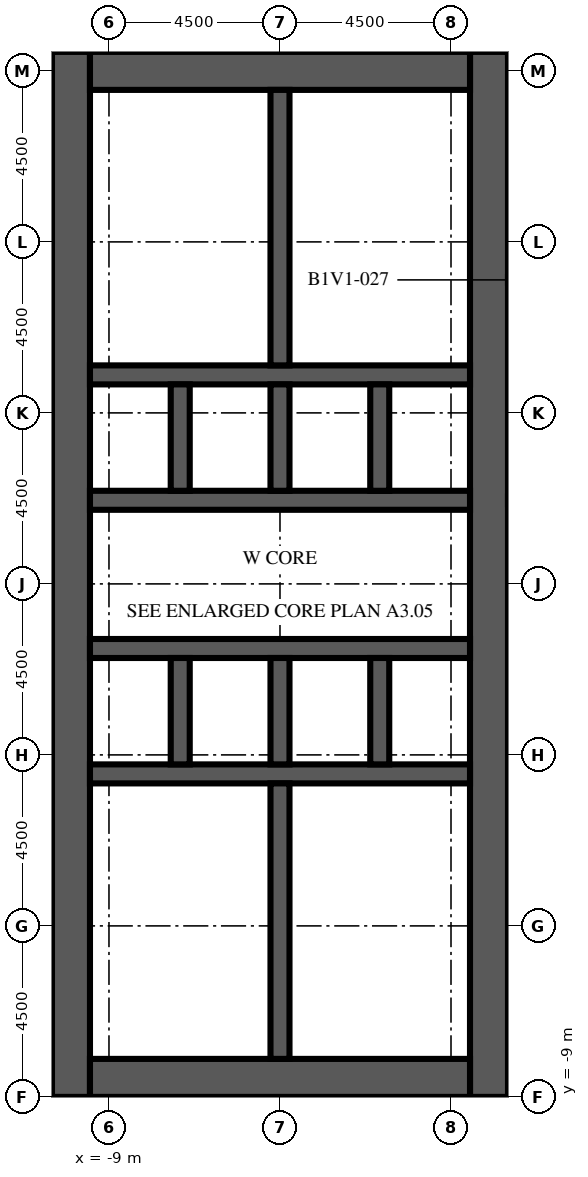
"""IFC4 building model, lengths in metres.
Left out: names, types, materials, properties, quantities, classifications, styles, units other than length and angle.
Written with IfcOpenShell. Run it as: python <this file> out.ifc"""

import sys

from ifc_helpers import new_model, si_unit, direction, frame, frame_2d, origin, place, context, subcontext, project, spatial, rectangle, extrude, element, fill, save


model = new_model("IFC4")
c1 = context("Model", 3, precision=1e-05, world=origin(), true_north=direction((0.0, 1.0)))
c2 = subcontext(c1, "Body", "Model", "MODEL_VIEW")
j1 = project(units=[si_unit("LENGTHUNIT", "METRE"), si_unit("PLANEANGLEUNIT", "RADIAN")], contexts=[c1])
p1 = place(None, origin())
s1 = spatial("IfcSite", under=j1, at=p1, CompositionType="ELEMENT")
p2 = place(p1, origin())
s2 = spatial("IfcBuilding", under=s1, at=p2, CompositionType="ELEMENT")
p3 = place(p2, frame((0.0, 0.0, 23.6)))
s3 = spatial("IfcBuildingStorey", under=s2, at=p3, CompositionType="ELEMENT", Elevation=23.6)
p4 = place(p3, frame((-10.0, -9.0, 0.0), z_axis=(0.0, 0.0, 1.0), x_axis=(0.0, 1.0, 0.0)))
e1 = element("IfcWall", 1, at=p4, inside=s3, PredefinedType="SHEAR", context=c2, shape_type="SweptSolid", body=[
    extrude(rectangle(XDim=27.5, YDim=1.0, at=frame_2d((13.75, 0.0))), origin(), (0.0, 0.0, 1.0), 4.1),
])
p5 = place(p4, frame((12.55, 0.0, 0.0)))
e2 = element("IfcOpeningElement", 2, at=p5, cuts=e1, PredefinedType="OPENING", context=c2, shape_type="SweptSolid", body=[
    extrude(rectangle(XDim=2.4, YDim=2.4, at=frame_2d((1.2, 1.2))), frame((0.0, 0.51, 0.0), z_axis=(0.0, -1.0, 0.0), x_axis=(1.0, 0.0, 0.0)), (0.0, 0.0, 1.0), 1.02),
])
p6 = place(p4, frame((6.825, 0.0, 0.0)))
e3 = element("IfcOpeningElement", 3, at=p6, cuts=e1, PredefinedType="OPENING", context=c2, shape_type="SweptSolid", body=[
    extrude(rectangle(XDim=1.2, YDim=2.1, at=frame_2d((0.6, 1.05))), frame((0.0, 0.51, 0.0), z_axis=(0.0, -1.0, 0.0), x_axis=(1.0, 0.0, 0.0)), (0.0, 0.0, 1.0), 1.02),
])
p7 = place(p4, frame((19.475, 0.0, 0.0)))
e4 = element("IfcOpeningElement", 4, at=p7, cuts=e1, PredefinedType="OPENING", context=c2, shape_type="SweptSolid", body=[
    extrude(rectangle(XDim=1.2, YDim=2.1, at=frame_2d((0.6, 1.05))), frame((0.0, 0.51, 0.0), z_axis=(0.0, -1.0, 0.0), x_axis=(1.0, 0.0, 0.0)), (0.0, 0.0, 1.0), 1.02),
])
p8 = place(p3, frame((1.0, -9.0, 0.0), z_axis=(0.0, 0.0, 1.0), x_axis=(0.0, 1.0, 0.0)))
e5 = element("IfcWall", 5, at=p8, inside=s3, PredefinedType="SHEAR", context=c2, shape_type="SweptSolid", body=[
    extrude(rectangle(XDim=27.5, YDim=1.0, at=frame_2d((13.75, 0.0))), origin(), (0.0, 0.0, 1.0), 4.1),
])
p9 = place(p8, frame((12.55, 0.0, 0.0)))
e6 = element("IfcOpeningElement", 6, at=p9, cuts=e5, PredefinedType="OPENING", context=c2, shape_type="SweptSolid", body=[
    extrude(rectangle(XDim=2.4, YDim=2.4, at=frame_2d((1.2, 1.2))), frame((0.0, 0.51, 0.0), z_axis=(0.0, -1.0, 0.0), x_axis=(1.0, 0.0, 0.0)), (0.0, 0.0, 1.0), 1.02),
])
p10 = place(p8, frame((3.955, 0.0, 0.0)))
e7 = element("IfcOpeningElement", 7, at=p10, cuts=e5, PredefinedType="OPENING", context=c2, shape_type="SweptSolid", body=[
    extrude(rectangle(XDim=0.905, YDim=2.1, at=frame_2d((0.453, 1.05))), frame((0.0, 0.51, 0.0), z_axis=(0.0, -1.0, 0.0), x_axis=(1.0, 0.0, 0.0)), (0.0, 0.0, 1.0), 1.02),
])
p11 = place(p8, frame((23.363, 0.0, 0.0)))
e8 = element("IfcOpeningElement", 8, at=p11, cuts=e5, PredefinedType="OPENING", context=c2, shape_type="SweptSolid", body=[
    extrude(rectangle(XDim=1.2, YDim=2.1, at=frame_2d((0.6, 1.05))), frame((0.0, 0.51, 0.0), z_axis=(0.0, -1.0, 0.0), x_axis=(1.0, 0.0, 0.0)), (0.0, 0.0, 1.0), 1.02),
])
for number, where, z_axis, x_axis in (
    (9, (-9.5, -8.5, 0.0), (0.0, 0.0, 1.0), (1.0, 0.0, 0.0)),
    (10, (-9.5, 18.0, 0.0), (0.0, 0.0, 1.0), (1.0, 0.0, 0.0)),
):
    element("IfcWall", number, at=place(p3, frame(where, z_axis=z_axis, x_axis=x_axis)), inside=s3, PredefinedType="SHEAR", context=c2, shape_type="SweptSolid", body=[
        extrude(rectangle(XDim=10.0, YDim=1.0, at=frame_2d((5.0, 0.0))), origin(), (0.0, 0.0, 1.0), 4.1),
    ])
p12 = place(p3, frame((-9.5, -0.5, 0.0), z_axis=(0.0, 0.0, 1.0), x_axis=(1.0, 0.0, 0.0)))
e11 = element("IfcWall", 11, at=p12, inside=s3, PredefinedType="SHEAR", context=c2, shape_type="SweptSolid", body=[
    extrude(rectangle(XDim=10.0, YDim=0.5, at=frame_2d((5.0, 0.0))), origin(), (0.0, 0.0, 1.0), 4.1),
])
p13 = place(p3, frame((-9.5, 2.8, 0.0), z_axis=(0.0, 0.0, 1.0), x_axis=(1.0, 0.0, 0.0)))
e12 = element("IfcWall", 12, at=p13, inside=s3, PredefinedType="SHEAR", context=c2, shape_type="SweptSolid", body=[
    extrude(rectangle(XDim=10.0, YDim=0.5, at=frame_2d((5.0, 0.0))), origin(), (0.0, 0.0, 1.0), 4.1),
])
p14 = place(p13, frame((0.512, 0.0, 0.0)))
e13 = element("IfcOpeningElement", 13, at=p14, cuts=e12, PredefinedType="OPENING", context=c2, shape_type="SweptSolid", body=[
    extrude(rectangle(XDim=1.1, YDim=2.1, at=frame_2d((0.55, 1.05))), frame((0.0, 0.26, 0.0), z_axis=(0.0, -1.0, 0.0), x_axis=(1.0, 0.0, 0.0)), (0.0, 0.0, 1.0), 0.52),
])
p15 = place(p13, frame((3.137, 0.0, 0.0)))
e14 = element("IfcOpeningElement", 14, at=p15, cuts=e12, PredefinedType="OPENING", context=c2, shape_type="SweptSolid", body=[
    extrude(rectangle(XDim=1.1, YDim=2.1, at=frame_2d((0.55, 1.05))), frame((0.0, 0.26, 0.0), z_axis=(0.0, -1.0, 0.0), x_axis=(1.0, 0.0, 0.0)), (0.0, 0.0, 1.0), 0.52),
])
p16 = place(p13, frame((8.387, 0.0, 0.0)))
e15 = element("IfcOpeningElement", 15, at=p16, cuts=e12, PredefinedType="OPENING", context=c2, shape_type="SweptSolid", body=[
    extrude(rectangle(XDim=1.1, YDim=2.1, at=frame_2d((0.55, 1.05))), frame((0.0, 0.26, 0.0), z_axis=(0.0, -1.0, 0.0), x_axis=(1.0, 0.0, 0.0)), (0.0, 0.0, 1.0), 0.52),
])
p17 = place(p3, frame((-9.5, 6.7, 0.0), z_axis=(0.0, 0.0, 1.0), x_axis=(1.0, 0.0, 0.0)))
e16 = element("IfcWall", 16, at=p17, inside=s3, PredefinedType="SHEAR", context=c2, shape_type="SweptSolid", body=[
    extrude(rectangle(XDim=10.0, YDim=0.5, at=frame_2d((5.0, 0.0))), origin(), (0.0, 0.0, 1.0), 4.1),
])
p18 = place(p17, frame((0.512, 0.0, 0.0)))
e17 = element("IfcOpeningElement", 17, at=p18, cuts=e16, PredefinedType="OPENING", context=c2, shape_type="SweptSolid", body=[
    extrude(rectangle(XDim=1.1, YDim=2.1, at=frame_2d((0.55, 1.05))), frame((0.0, 0.26, 0.0), z_axis=(0.0, -1.0, 0.0), x_axis=(1.0, 0.0, 0.0)), (0.0, 0.0, 1.0), 0.52),
])
p19 = place(p17, frame((3.188, 0.0, 0.0)))
e18 = element("IfcOpeningElement", 18, at=p19, cuts=e16, PredefinedType="OPENING", context=c2, shape_type="SweptSolid", body=[
    extrude(rectangle(XDim=1.0, YDim=2.1, at=frame_2d((0.5, 1.05))), frame((0.0, 0.26, 0.0), z_axis=(0.0, -1.0, 0.0), x_axis=(1.0, 0.0, 0.0)), (0.0, 0.0, 1.0), 0.52),
])
p20 = place(p17, frame((5.812, 0.0, 0.0)))
e19 = element("IfcOpeningElement", 19, at=p20, cuts=e16, PredefinedType="OPENING", context=c2, shape_type="SweptSolid", body=[
    extrude(rectangle(XDim=1.0, YDim=2.1, at=frame_2d((0.5, 1.05))), frame((0.0, 0.26, 0.0), z_axis=(0.0, -1.0, 0.0), x_axis=(1.0, 0.0, 0.0)), (0.0, 0.0, 1.0), 0.52),
])
p21 = place(p17, frame((8.438, 0.0, 0.0)))
e20 = element("IfcOpeningElement", 20, at=p21, cuts=e16, PredefinedType="OPENING", context=c2, shape_type="SweptSolid", body=[
    extrude(rectangle(XDim=1.0, YDim=2.1, at=frame_2d((0.5, 1.05))), frame((0.0, 0.26, 0.0), z_axis=(0.0, -1.0, 0.0), x_axis=(1.0, 0.0, 0.0)), (0.0, 0.0, 1.0), 0.52),
])
p22 = place(p3, frame((-9.5, 10.0, 0.0), z_axis=(0.0, 0.0, 1.0), x_axis=(1.0, 0.0, 0.0)))
e21 = element("IfcWall", 21, at=p22, inside=s3, PredefinedType="SHEAR", context=c2, shape_type="SweptSolid", body=[
    extrude(rectangle(XDim=10.0, YDim=0.5, at=frame_2d((5.0, 0.0))), origin(), (0.0, 0.0, 1.0), 4.1),
])
for number, where, z_axis, x_axis in (
    (22, (-7.125, -0.25, 0.0), (0.0, 0.0, 1.0), (0.0, 1.0, 0.0)),
    (23, (-7.125, 6.95, 0.0), (0.0, 0.0, 1.0), (0.0, 1.0, 0.0)),
    (24, (-4.5, -0.25, 0.0), (0.0, 0.0, 1.0), (0.0, 1.0, 0.0)),
    (25, (-4.5, 6.95, 0.0), (0.0, 0.0, 1.0), (0.0, 1.0, 0.0)),
    (26, (-1.875, -0.25, 0.0), (0.0, 0.0, 1.0), (0.0, 1.0, 0.0)),
    (27, (-1.875, 6.95, 0.0), (0.0, 0.0, 1.0), (0.0, 1.0, 0.0)),
):
    element("IfcWall", number, at=place(p3, frame(where, z_axis=z_axis, x_axis=x_axis)), inside=s3, PredefinedType="SHEAR", context=c2, shape_type="SweptSolid", body=[
        extrude(rectangle(XDim=2.8, YDim=0.5, at=frame_2d((1.4, 0.0))), origin(), (0.0, 0.0, 1.0), 4.1),
    ])
for number, where, z_axis, x_axis in (
    (28, (-4.5, -8.0, 0.0), (0.0, 0.0, 1.0), (0.0, 1.0, 0.0)),
    (29, (-4.5, 10.25, 0.0), (0.0, 0.0, 1.0), (0.0, 1.0, 0.0)),
):
    element("IfcWall", number, at=place(p3, frame(where, z_axis=z_axis, x_axis=x_axis)), inside=s3, PredefinedType="SHEAR", context=c2, shape_type="SweptSolid", body=[
        extrude(rectangle(XDim=7.25, YDim=0.5, at=frame_2d((3.625, 0.0))), origin(), (0.0, 0.0, 1.0), 4.1),
    ])
p23 = place(p3, frame((-4.25, -5.245, 0.0), z_axis=(0.0, 0.0, 1.0), x_axis=(1.0, 0.0, 0.0)))
e30 = element("IfcWall", 30, at=p23, inside=s3, PredefinedType="PARTITIONING", context=c2, shape_type="SweptSolid", body=[
    extrude(rectangle(XDim=4.75, YDim=0.1, at=frame_2d((2.375, 0.0))), origin(), (0.0, 0.0, 1.0), 3.65),
])
p24 = place(p23, frame((1.875, 0.0, 0.0)))
e31 = element("IfcOpeningElement", 31, at=p24, cuts=e30, PredefinedType="OPENING", context=c2, shape_type="SweptSolid", body=[
    extrude(rectangle(XDim=1.0, YDim=2.1, at=frame_2d((0.5, 1.05))), frame((0.0, 0.06, 0.0), z_axis=(0.0, -1.0, 0.0), x_axis=(1.0, 0.0, 0.0)), (0.0, 0.0, 1.0), 0.12),
])
p25 = place(p3, frame((-2.445, -3.94, 0.0), z_axis=(0.0, 0.0, 1.0), x_axis=(1.0, 0.0, 0.0)))
e32 = element("IfcWall", 32, at=p25, inside=s3, PredefinedType="PARTITIONING", context=c2, shape_type="SweptSolid", body=[
    extrude(rectangle(XDim=2.945, YDim=0.1, at=frame_2d((1.473, 0.0))), origin(), (0.0, 0.0, 1.0), 3.65),
])
p26 = place(p25, frame((0.972, 0.0, 0.0)))
e33 = element("IfcOpeningElement", 33, at=p26, cuts=e32, PredefinedType="OPENING", context=c2, shape_type="SweptSolid", body=[
    extrude(rectangle(XDim=1.0, YDim=2.1, at=frame_2d((0.5, 1.05))), frame((0.0, 0.06, 0.0), z_axis=(0.0, -1.0, 0.0), x_axis=(1.0, 0.0, 0.0)), (0.0, 0.0, 1.0), 0.12),
])
p27 = place(p3, frame((-4.25, -3.94, 0.0), z_axis=(0.0, 0.0, 1.0), x_axis=(1.0, 0.0, 0.0)))
e34 = element("IfcWall", 34, at=p27, inside=s3, PredefinedType="PARTITIONING", context=c2, shape_type="SweptSolid", body=[
    extrude(rectangle(XDim=1.805, YDim=0.1, at=frame_2d((0.902, 0.0))), origin(), (0.0, 0.0, 1.0), 3.65),
])
p28 = place(p27, frame((0.403, 0.0, 0.0)))
e35 = element("IfcOpeningElement", 35, at=p28, cuts=e34, PredefinedType="OPENING", context=c2, shape_type="SweptSolid", body=[
    extrude(rectangle(XDim=1.0, YDim=2.1, at=frame_2d((0.5, 1.05))), frame((0.0, 0.06, 0.0), z_axis=(0.0, -1.0, 0.0), x_axis=(1.0, 0.0, 0.0)), (0.0, 0.0, 1.0), 0.12),
])
p29 = place(p3, frame((-2.445, -3.94, 0.0), z_axis=(0.0, 0.0, 1.0), x_axis=(0.0, 1.0, 0.0)))
e36 = element("IfcWall", 36, at=p29, inside=s3, PredefinedType="PARTITIONING", context=c2, shape_type="SweptSolid", body=[
    extrude(rectangle(XDim=3.19, YDim=0.1, at=frame_2d((1.595, 0.0))), origin(), (0.0, 0.0, 1.0), 3.65),
])
p30 = place(p3, frame((-0.8, 12.425, 0.0), z_axis=(0.0, 0.0, 1.0), x_axis=(1.0, 0.0, 0.0)))
e37 = element("IfcWall", 37, at=p30, inside=s3, PredefinedType="PARTITIONING", context=c2, shape_type="SweptSolid", body=[
    extrude(rectangle(XDim=1.3, YDim=0.1, at=frame_2d((0.65, 0.0))), origin(), (0.0, 0.0, 1.0), 3.65),
])
p31 = place(p30, frame((0.2, 0.0, 0.0)))
e38 = element("IfcOpeningElement", 38, at=p31, cuts=e37, PredefinedType="OPENING", context=c2, shape_type="SweptSolid", body=[
    extrude(rectangle(XDim=0.9, YDim=2.1, at=frame_2d((0.45, 1.05))), frame((0.0, 0.06, 0.0), z_axis=(0.0, -1.0, 0.0), x_axis=(1.0, 0.0, 0.0)), (0.0, 0.0, 1.0), 0.12),
])
p32 = place(p3, frame((-4.25, 12.425, 0.0), z_axis=(0.0, 0.0, 1.0), x_axis=(1.0, 0.0, 0.0)))
e39 = element("IfcWall", 39, at=p32, inside=s3, PredefinedType="PARTITIONING", context=c2, shape_type="SweptSolid", body=[
    extrude(rectangle(XDim=3.45, YDim=0.1, at=frame_2d((1.725, 0.0))), origin(), (0.0, 0.0, 1.0), 3.65),
])
p33 = place(p3, frame((-0.8, 12.425, 0.0), z_axis=(0.0, 0.0, 1.0), x_axis=(0.0, 1.0, 0.0)))
e40 = element("IfcWall", 40, at=p33, inside=s3, PredefinedType="PARTITIONING", context=c2, shape_type="SweptSolid", body=[
    extrude(rectangle(XDim=2.537, YDim=0.1, at=frame_2d((1.269, 0.0))), origin(), (0.0, 0.0, 1.0), 3.65),
])
p34 = place(p33, frame((0.769, 0.0, 0.0)))
e41 = element("IfcOpeningElement", 41, at=p34, cuts=e40, PredefinedType="OPENING", context=c2, shape_type="SweptSolid", body=[
    extrude(rectangle(XDim=1.0, YDim=2.1, at=frame_2d((0.5, 1.05))), frame((0.0, 0.06, 0.0), z_axis=(0.0, -1.0, 0.0), x_axis=(1.0, 0.0, 0.0)), (0.0, 0.0, 1.0), 0.12),
])
p35 = place(p3, frame((-0.8, 14.962, 0.0), z_axis=(0.0, 0.0, 1.0), x_axis=(0.0, 1.0, 0.0)))
e42 = element("IfcWall", 42, at=p35, inside=s3, PredefinedType="PARTITIONING", context=c2, shape_type="SweptSolid", body=[
    extrude(rectangle(XDim=2.538, YDim=0.1, at=frame_2d((1.269, 0.0))), origin(), (0.0, 0.0, 1.0), 3.65),
])
p36 = place(p35, frame((0.769, 0.0, 0.0)))
e43 = element("IfcOpeningElement", 43, at=p36, cuts=e42, PredefinedType="OPENING", context=c2, shape_type="SweptSolid", body=[
    extrude(rectangle(XDim=1.0, YDim=2.1, at=frame_2d((0.5, 1.05))), frame((0.0, 0.06, 0.0), z_axis=(0.0, -1.0, 0.0), x_axis=(1.0, 0.0, 0.0)), (0.0, 0.0, 1.0), 0.12),
])
p37 = place(p3, frame((-4.25, 14.962, 0.0), z_axis=(0.0, 0.0, 1.0), x_axis=(1.0, 0.0, 0.0)))
e44 = element("IfcWall", 44, at=p37, inside=s3, PredefinedType="PARTITIONING", context=c2, shape_type="SweptSolid", body=[
    extrude(rectangle(XDim=3.45, YDim=0.1, at=frame_2d((1.725, 0.0))), origin(), (0.0, 0.0, 1.0), 3.65),
])
p38 = place(p14, origin())
e45 = element("IfcDoor", 45, at=p38, inside=s3, OperationType="DOUBLE_DOOR_SLIDING", PredefinedType="DOOR", context=c2, shape_type="SweptSolid", body=[
    extrude(rectangle(XDim=1.1, YDim=2.1, at=frame_2d((0.55, 1.05))), frame((0.0, 0.025, 0.0), z_axis=(0.0, -1.0, 0.0), x_axis=(1.0, 0.0, 0.0)), (0.0, 0.0, 1.0), 0.05),
])
fill(e13, e45)
p39 = place(p15, origin())
e46 = element("IfcDoor", 46, at=p39, inside=s3, OperationType="DOUBLE_DOOR_SLIDING", PredefinedType="DOOR", context=c2, shape_type="SweptSolid", body=[
    extrude(rectangle(XDim=1.1, YDim=2.1, at=frame_2d((0.55, 1.05))), frame((0.0, 0.025, 0.0), z_axis=(0.0, -1.0, 0.0), x_axis=(1.0, 0.0, 0.0)), (0.0, 0.0, 1.0), 0.05),
])
fill(e14, e46)
p40 = place(p16, origin())
e47 = element("IfcDoor", 47, at=p40, inside=s3, OperationType="DOUBLE_DOOR_SLIDING", PredefinedType="DOOR", context=c2, shape_type="SweptSolid", body=[
    extrude(rectangle(XDim=1.1, YDim=2.1, at=frame_2d((0.55, 1.05))), frame((0.0, 0.025, 0.0), z_axis=(0.0, -1.0, 0.0), x_axis=(1.0, 0.0, 0.0)), (0.0, 0.0, 1.0), 0.05),
])
fill(e15, e47)
p41 = place(p18, origin())
e48 = element("IfcDoor", 48, at=p41, inside=s3, OperationType="DOUBLE_DOOR_SLIDING", PredefinedType="DOOR", context=c2, shape_type="SweptSolid", body=[
    extrude(rectangle(XDim=1.1, YDim=2.1, at=frame_2d((0.55, 1.05))), frame((0.0, 0.025, 0.0), z_axis=(0.0, -1.0, 0.0), x_axis=(1.0, 0.0, 0.0)), (0.0, 0.0, 1.0), 0.05),
])
fill(e17, e48)
p42 = place(p5, origin())
e49 = element("IfcDoor", 49, at=p42, inside=s3, OperationType="DOUBLE_DOOR_DOUBLE_SWING", PredefinedType="DOOR", context=c2, shape_type="SweptSolid", body=[
    extrude(rectangle(XDim=2.4, YDim=2.4, at=frame_2d((1.2, 1.2))), frame((0.0, 0.025, 0.0), z_axis=(0.0, -1.0, 0.0), x_axis=(1.0, 0.0, 0.0)), (0.0, 0.0, 1.0), 0.05),
])
fill(e2, e49)
p43 = place(p9, origin())
e50 = element("IfcDoor", 50, at=p43, inside=s3, OperationType="DOUBLE_DOOR_DOUBLE_SWING", PredefinedType="DOOR", context=c2, shape_type="SweptSolid", body=[
    extrude(rectangle(XDim=2.4, YDim=2.4, at=frame_2d((1.2, 1.2))), frame((0.0, 0.025, 0.0), z_axis=(0.0, -1.0, 0.0), x_axis=(1.0, 0.0, 0.0)), (0.0, 0.0, 1.0), 0.05),
])
fill(e6, e50)
p44 = place(p6, origin())
e51 = element("IfcDoor", 51, at=p44, inside=s3, OperationType="SINGLE_SWING_LEFT", PredefinedType="DOOR", context=c2, shape_type="SweptSolid", body=[
    extrude(rectangle(XDim=1.2, YDim=2.1, at=frame_2d((0.6, 1.05))), frame((0.0, 0.025, 0.0), z_axis=(0.0, -1.0, 0.0), x_axis=(1.0, 0.0, 0.0)), (0.0, 0.0, 1.0), 0.05),
])
fill(e3, e51)
p45 = place(p7, origin())
e52 = element("IfcDoor", 52, at=p45, inside=s3, OperationType="SINGLE_SWING_LEFT", PredefinedType="DOOR", context=c2, shape_type="SweptSolid", body=[
    extrude(rectangle(XDim=1.2, YDim=2.1, at=frame_2d((0.6, 1.05))), frame((0.0, 0.025, 0.0), z_axis=(0.0, -1.0, 0.0), x_axis=(1.0, 0.0, 0.0)), (0.0, 0.0, 1.0), 0.05),
])
fill(e4, e52)
p46 = place(p19, origin())
e53 = element("IfcDoor", 53, at=p46, inside=s3, OperationType="SINGLE_SWING_RIGHT", PredefinedType="DOOR", context=c2, shape_type="SweptSolid", body=[
    extrude(rectangle(XDim=1.0, YDim=2.1, at=frame_2d((0.5, 1.05))), frame((0.0, 0.025, 0.0), z_axis=(0.0, -1.0, 0.0), x_axis=(1.0, 0.0, 0.0)), (0.0, 0.0, 1.0), 0.05),
])
fill(e18, e53)
p47 = place(p20, origin())
e54 = element("IfcDoor", 54, at=p47, inside=s3, OperationType="SINGLE_SWING_LEFT", PredefinedType="DOOR", context=c2, shape_type="SweptSolid", body=[
    extrude(rectangle(XDim=1.0, YDim=2.1, at=frame_2d((0.5, 1.05))), frame((0.0, 0.025, 0.0), z_axis=(0.0, -1.0, 0.0), x_axis=(1.0, 0.0, 0.0)), (0.0, 0.0, 1.0), 0.05),
])
fill(e19, e54)
p48 = place(p21, origin())
e55 = element("IfcDoor", 55, at=p48, inside=s3, OperationType="SINGLE_SWING_RIGHT", PredefinedType="DOOR", context=c2, shape_type="SweptSolid", body=[
    extrude(rectangle(XDim=1.0, YDim=2.1, at=frame_2d((0.5, 1.05))), frame((0.0, 0.025, 0.0), z_axis=(0.0, -1.0, 0.0), x_axis=(1.0, 0.0, 0.0)), (0.0, 0.0, 1.0), 0.05),
])
fill(e20, e55)
p49 = place(p10, origin())
e56 = element("IfcDoor", 56, at=p49, inside=s3, OperationType="SINGLE_SWING_LEFT", PredefinedType="DOOR", context=c2, shape_type="SweptSolid", body=[
    extrude(rectangle(XDim=0.905, YDim=2.1, at=frame_2d((0.453, 1.05))), frame((0.0, 0.475, 0.0), z_axis=(0.0, -1.0, 0.0), x_axis=(1.0, 0.0, 0.0)), (0.0, 0.0, 1.0), 0.05),
])
fill(e7, e56)
p50 = place(p24, origin())
e57 = element("IfcDoor", 57, at=p50, inside=s3, OperationType="SINGLE_SWING_RIGHT", PredefinedType="DOOR", context=c2, shape_type="SweptSolid", body=[
    extrude(rectangle(XDim=1.0, YDim=2.1, at=frame_2d((0.5, 1.05))), frame((0.0, 0.025, 0.0), z_axis=(0.0, -1.0, 0.0), x_axis=(1.0, 0.0, 0.0)), (0.0, 0.0, 1.0), 0.05),
])
fill(e31, e57)
p51 = place(p26, origin())
e58 = element("IfcDoor", 58, at=p51, inside=s3, OperationType="SINGLE_SWING_LEFT", PredefinedType="DOOR", context=c2, shape_type="SweptSolid", body=[
    extrude(rectangle(XDim=1.0, YDim=2.1, at=frame_2d((0.5, 1.05))), frame((0.0, 0.025, 0.0), z_axis=(0.0, -1.0, 0.0), x_axis=(1.0, 0.0, 0.0)), (0.0, 0.0, 1.0), 0.05),
])
fill(e33, e58)
p52 = place(p28, origin())
e59 = element("IfcDoor", 59, at=p52, inside=s3, OperationType="SINGLE_SWING_RIGHT", PredefinedType="DOOR", context=c2, shape_type="SweptSolid", body=[
    extrude(rectangle(XDim=1.0, YDim=2.1, at=frame_2d((0.5, 1.05))), frame((0.0, 0.025, 0.0), z_axis=(0.0, -1.0, 0.0), x_axis=(1.0, 0.0, 0.0)), (0.0, 0.0, 1.0), 0.05),
])
fill(e35, e59)
p53 = place(p31, origin())
e60 = element("IfcDoor", 60, at=p53, inside=s3, OperationType="SINGLE_SWING_LEFT", PredefinedType="DOOR", context=c2, shape_type="SweptSolid", body=[
    extrude(rectangle(XDim=0.9, YDim=2.1, at=frame_2d((0.45, 1.05))), frame((0.0, 0.025, 0.0), z_axis=(0.0, -1.0, 0.0), x_axis=(1.0, 0.0, 0.0)), (0.0, 0.0, 1.0), 0.05),
])
fill(e38, e60)
p54 = place(p11, origin())
e61 = element("IfcDoor", 61, at=p54, inside=s3, OperationType="SINGLE_SWING_RIGHT", PredefinedType="DOOR", context=c2, shape_type="SweptSolid", body=[
    extrude(rectangle(XDim=1.2, YDim=2.1, at=frame_2d((0.6, 1.05))), frame((0.0, 0.475, 0.0), z_axis=(0.0, -1.0, 0.0), x_axis=(1.0, 0.0, 0.0)), (0.0, 0.0, 1.0), 0.05),
])
fill(e8, e61)
p55 = place(p34, origin())
e62 = element("IfcDoor", 62, at=p55, inside=s3, OperationType="SINGLE_SWING_LEFT", PredefinedType="DOOR", context=c2, shape_type="SweptSolid", body=[
    extrude(rectangle(XDim=1.0, YDim=2.1, at=frame_2d((0.5, 1.05))), frame((0.0, 0.025, 0.0), z_axis=(0.0, -1.0, 0.0), x_axis=(1.0, 0.0, 0.0)), (0.0, 0.0, 1.0), 0.05),
])
fill(e41, e62)
p56 = place(p36, origin())
e63 = element("IfcDoor", 63, at=p56, inside=s3, OperationType="SINGLE_SWING_RIGHT", PredefinedType="DOOR", context=c2, shape_type="SweptSolid", body=[
    extrude(rectangle(XDim=1.0, YDim=2.1, at=frame_2d((0.5, 1.05))), frame((0.0, 0.025, 0.0), z_axis=(0.0, -1.0, 0.0), x_axis=(1.0, 0.0, 0.0)), (0.0, 0.0, 1.0), 0.05),
])
fill(e43, e63)
save(model, sys.argv[1])
